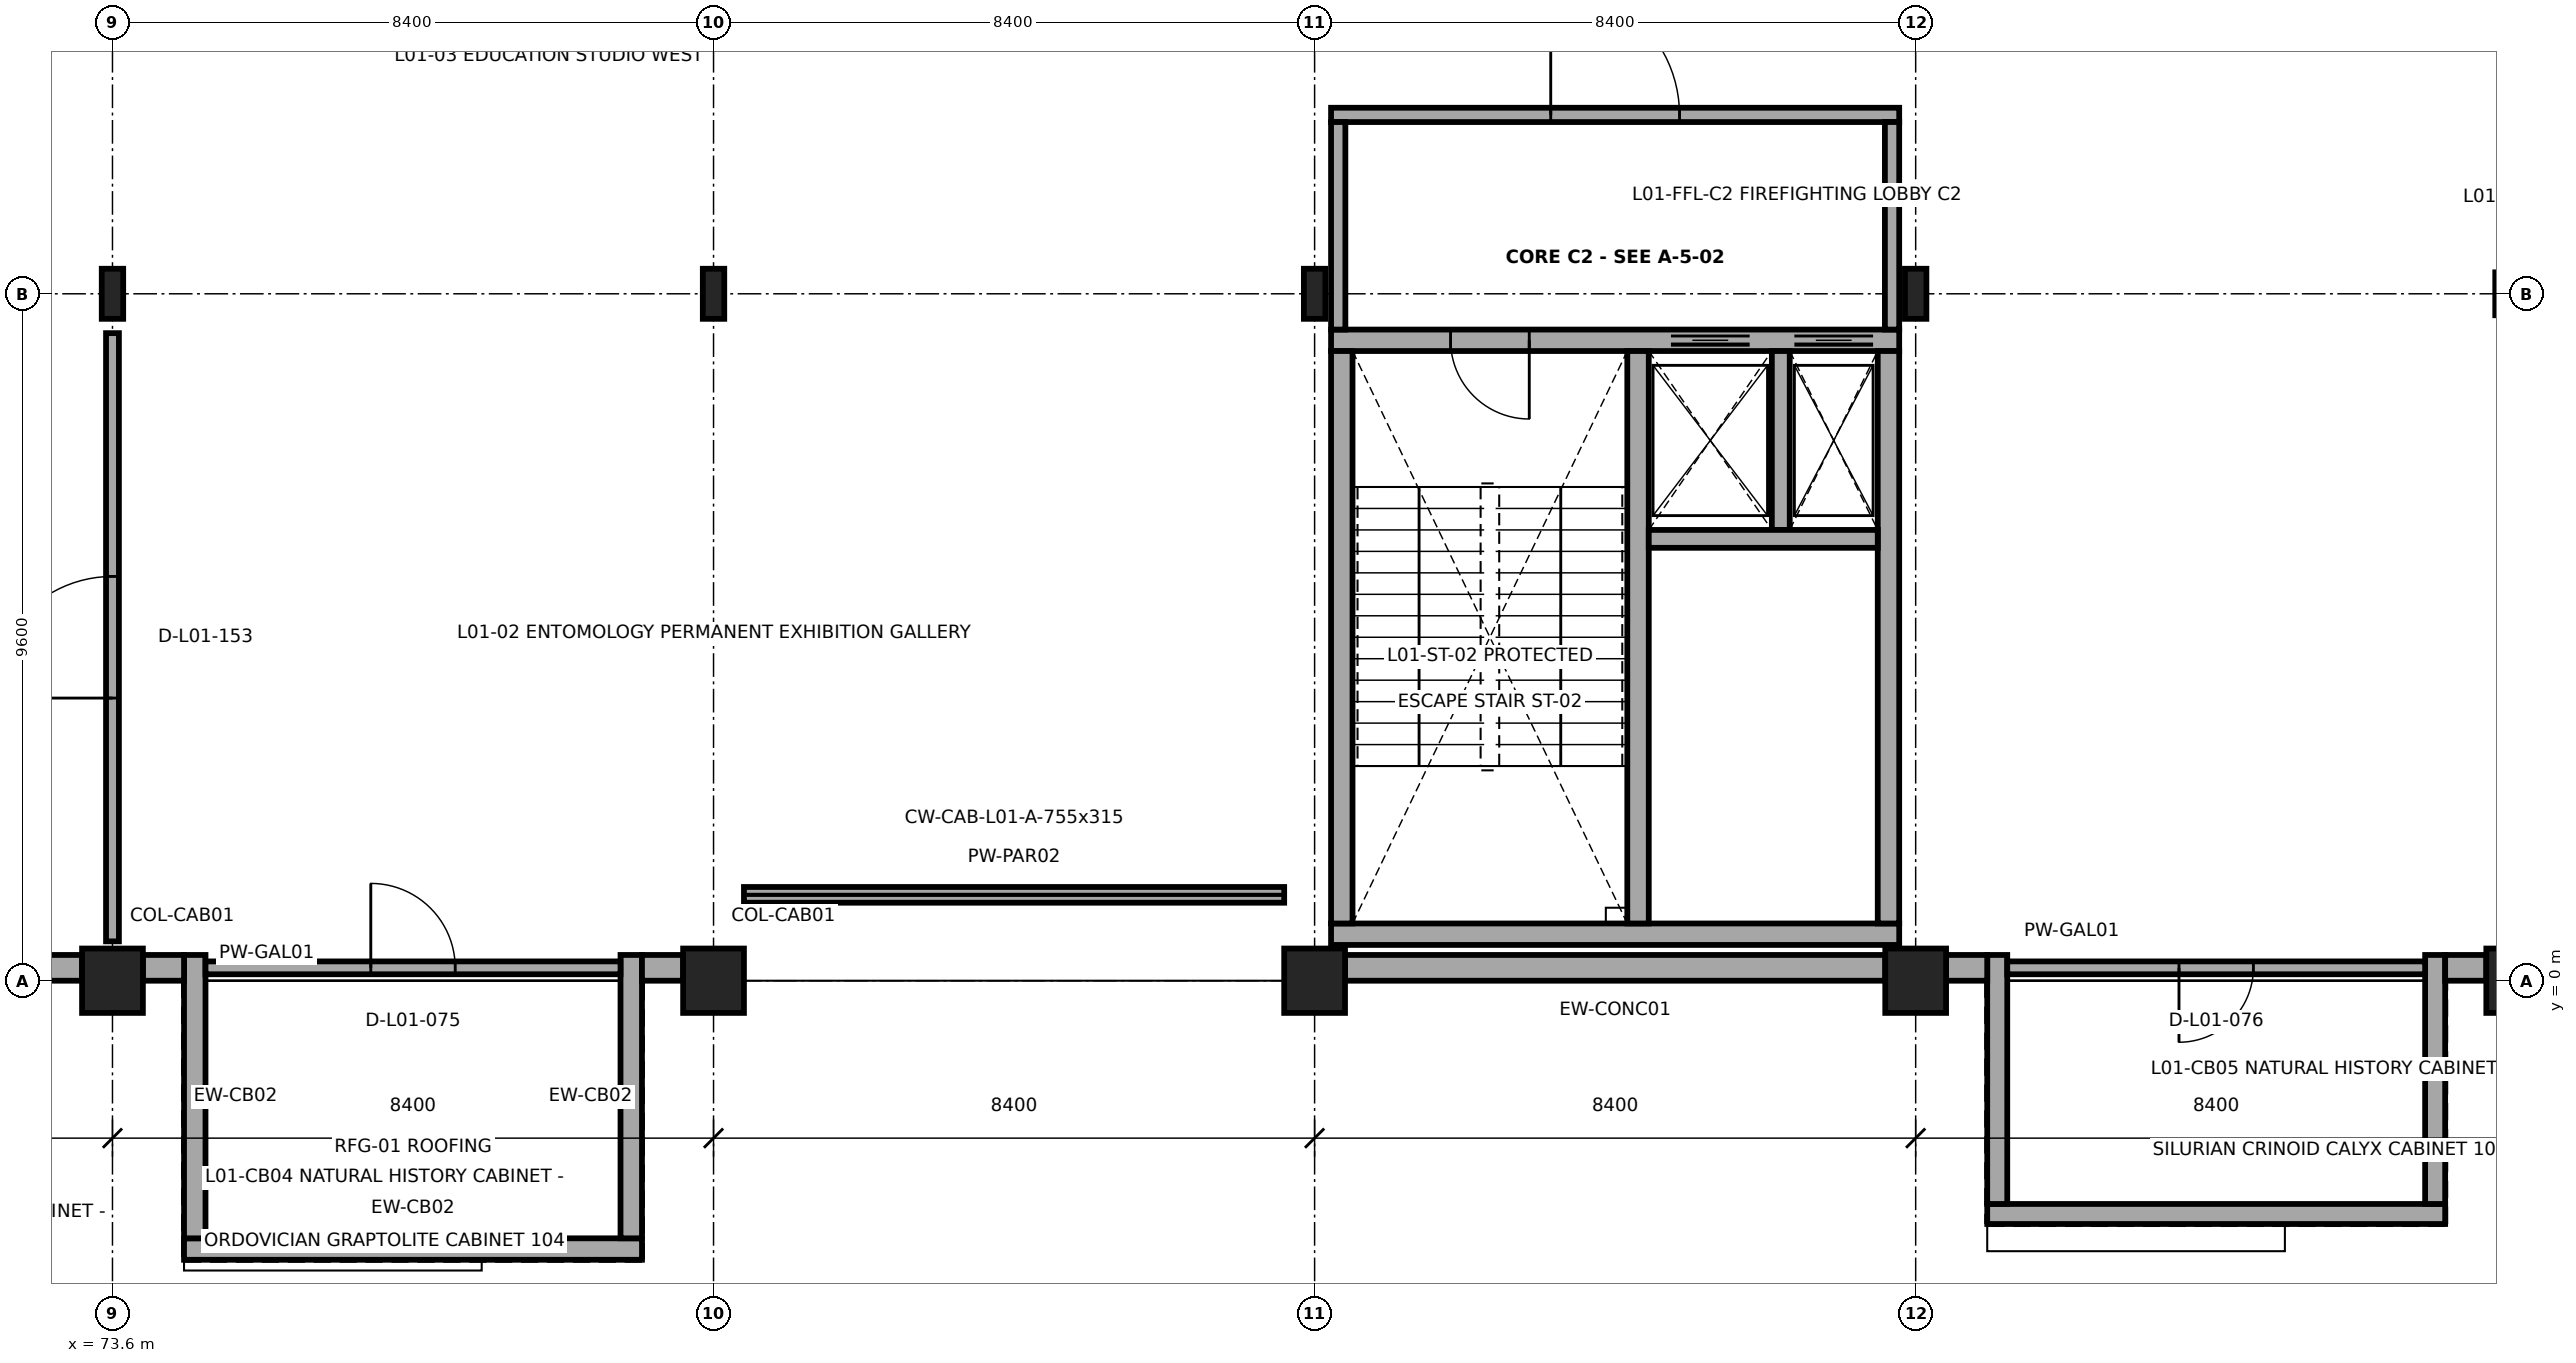
"""IFC4 building model, lengths in metres.
Left out: names, types, materials, properties, quantities, classifications, styles, units other than length and angle.
Written with IfcOpenShell. Run it as: python <this file> out.ifc"""

import sys

from ifc_helpers import new_model, si_unit, direction, frame, frame_2d, origin, origin_2d, place, context, subcontext, project, spatial, rectangle, i_section, extrude, element, fill, save


model = new_model("IFC4")
c1 = context("Model", 3, precision=1e-05, world=origin(), true_north=direction((0.0, 1.0)))
c2 = subcontext(c1, "Body", "Model", "MODEL_VIEW")
j1 = project(units=[si_unit("LENGTHUNIT", "METRE"), si_unit("PLANEANGLEUNIT", "RADIAN")], contexts=[c1])
p1 = place(None, origin())
s1 = spatial("IfcSite", under=j1, at=p1, CompositionType="ELEMENT")
p2 = place(p1, origin())
s2 = spatial("IfcBuilding", under=s1, at=p2, CompositionType="ELEMENT")
p3 = place(p2, frame((0.0, 0.0, 8.4)))
s3 = spatial("IfcBuildingStorey", under=s2, at=p3, CompositionType="ELEMENT", Elevation=8.4)
p4 = place(p3, frame((73.6, 0.0, 0.0), z_axis=(0.0, 0.0, 1.0), x_axis=(1.0, 0.0, 0.0)))
e1 = element("IfcColumn", 1, at=p4, inside=s3, PredefinedType="COLUMN", context=c2, shape_type="SweptSolid", body=[
    extrude(rectangle(XDim=0.85, YDim=0.9, at=origin_2d()), origin(), (0.0, 0.0, 1.0), 4.5),
])
p5 = place(p3, frame((73.6, 9.6, 0.0), z_axis=(0.0, 0.0, 1.0), x_axis=(1.0, 0.0, 0.0)))
e2 = element("IfcColumn", 2, at=p5, inside=s3, PredefinedType="COLUMN", context=c2, shape_type="SweptSolid", body=[
    extrude(i_section(OverallWidth=0.3, OverallDepth=0.7, WebThickness=0.017, FlangeThickness=0.032, FilletRadius=0.027, at=origin_2d()), origin(), (0.0, 0.0, 1.0), 4.5),
])
p6 = place(p3, frame((82.0, 0.0, 0.0), z_axis=(0.0, 0.0, 1.0), x_axis=(1.0, 0.0, 0.0)))
e3 = element("IfcColumn", 3, at=p6, inside=s3, PredefinedType="COLUMN", context=c2, shape_type="SweptSolid", body=[
    extrude(rectangle(XDim=0.85, YDim=0.9, at=origin_2d()), origin(), (0.0, 0.0, 1.0), 4.5),
])
p7 = place(p3, frame((82.0, 9.6, 0.0), z_axis=(0.0, 0.0, 1.0), x_axis=(1.0, 0.0, 0.0)))
e4 = element("IfcColumn", 4, at=p7, inside=s3, PredefinedType="COLUMN", context=c2, shape_type="SweptSolid", body=[
    extrude(i_section(OverallWidth=0.3, OverallDepth=0.7, WebThickness=0.017, FlangeThickness=0.032, FilletRadius=0.027, at=origin_2d()), origin(), (0.0, 0.0, 1.0), 4.5),
])
p8 = place(p3, frame((90.4, 0.0, 0.0), z_axis=(0.0, 0.0, 1.0), x_axis=(1.0, 0.0, 0.0)))
e5 = element("IfcColumn", 5, at=p8, inside=s3, PredefinedType="COLUMN", context=c2, shape_type="SweptSolid", body=[
    extrude(rectangle(XDim=0.85, YDim=0.9, at=origin_2d()), origin(), (0.0, 0.0, 1.0), 4.5),
])
p9 = place(p3, frame((90.4, 9.6, 0.0), z_axis=(0.0, 0.0, 1.0), x_axis=(1.0, 0.0, 0.0)))
e6 = element("IfcColumn", 6, at=p9, inside=s3, PredefinedType="COLUMN", context=c2, shape_type="SweptSolid", body=[
    extrude(i_section(OverallWidth=0.3, OverallDepth=0.7, WebThickness=0.017, FlangeThickness=0.032, FilletRadius=0.027, at=origin_2d()), origin(), (0.0, 0.0, 1.0), 4.5),
])
p10 = place(p3, frame((98.8, 0.0, 0.0), z_axis=(0.0, 0.0, 1.0), x_axis=(1.0, 0.0, 0.0)))
e7 = element("IfcColumn", 7, at=p10, inside=s3, PredefinedType="COLUMN", context=c2, shape_type="SweptSolid", body=[
    extrude(rectangle(XDim=0.85, YDim=0.9, at=origin_2d()), origin(), (0.0, 0.0, 1.0), 4.5),
])
p11 = place(p3, frame((98.8, 9.6, 0.0), z_axis=(0.0, 0.0, 1.0), x_axis=(1.0, 0.0, 0.0)))
e8 = element("IfcColumn", 8, at=p11, inside=s3, PredefinedType="COLUMN", context=c2, shape_type="SweptSolid", body=[
    extrude(i_section(OverallWidth=0.3, OverallDepth=0.7, WebThickness=0.017, FlangeThickness=0.032, FilletRadius=0.027, at=origin_2d()), origin(), (0.0, 0.0, 1.0), 4.5),
])
p12 = place(p3, frame((107.2, 0.0, 0.0), z_axis=(0.0, 0.0, 1.0), x_axis=(1.0, 0.0, 0.0)))
e9 = element("IfcColumn", 9, at=p12, inside=s3, PredefinedType="COLUMN", context=c2, shape_type="SweptSolid", body=[
    extrude(rectangle(XDim=0.85, YDim=0.9, at=origin_2d()), origin(), (0.0, 0.0, 1.0), 4.5),
])
p13 = place(p3, frame((74.6, -3.75, 0.0), z_axis=(0.0, 0.0, 1.0), x_axis=(1.0, 0.0, 0.0)))
e10 = element("IfcWall", 10, at=p13, inside=s3, PredefinedType="SOLIDWALL", context=c2, shape_type="SweptSolid", body=[
    extrude(rectangle(XDim=6.4, YDim=0.3, at=frame_2d((3.2, 0.0))), origin(), (0.0, 0.0, 1.0), 2.99),
])
for number, where, z_axis, x_axis in (
    (11, (74.75, 0.36, 0.0), (0.0, 0.0, 1.0), (0.0, -1.0, 0.0)),
    (12, (80.85, -3.6, 0.0), (0.0, 0.0, 1.0), (0.0, 1.0, 0.0)),
):
    element("IfcWall", number, at=place(p3, frame(where, z_axis=z_axis, x_axis=x_axis)), inside=s3, PredefinedType="SOLIDWALL", context=c2, shape_type="SweptSolid", body=[
        extrude(rectangle(XDim=3.96, YDim=0.3, at=frame_2d((1.98, 0.0))), origin(), (0.0, 0.0, 1.0), 2.99),
    ])
p14 = place(p3, frame((99.8, -3.26, 0.0), z_axis=(0.0, 0.0, 1.0), x_axis=(1.0, 0.0, 0.0)))
e13 = element("IfcWall", 13, at=p14, inside=s3, PredefinedType="SOLIDWALL", context=c2, shape_type="SweptSolid", body=[
    extrude(rectangle(XDim=6.4, YDim=0.28, at=frame_2d((3.2, 0.0))), origin(), (0.0, 0.0, 1.0), 2.99),
])
for number, where, z_axis, x_axis in (
    (14, (99.94, 0.36, 0.0), (0.0, 0.0, 1.0), (0.0, -1.0, 0.0)),
    (15, (106.06, -3.12, 0.0), (0.0, 0.0, 1.0), (0.0, 1.0, 0.0)),
):
    element("IfcWall", number, at=place(p3, frame(where, z_axis=z_axis, x_axis=x_axis)), inside=s3, PredefinedType="SOLIDWALL", context=c2, shape_type="SweptSolid", body=[
        extrude(rectangle(XDim=3.48, YDim=0.28, at=frame_2d((1.74, 0.0))), origin(), (0.0, 0.0, 1.0), 2.99),
    ])
p15 = place(p3, frame((72.6, 0.18, 0.0), z_axis=(0.0, 0.0, 1.0), x_axis=(1.0, 0.0, 0.0)))
e16 = element("IfcWall", 16, at=p15, inside=s3, PredefinedType="SOLIDWALL", context=c2, shape_type="SweptSolid", body=[
    extrude(rectangle(XDim=0.575, YDim=0.36, at=frame_2d((0.288, 0.0))), origin(), (0.0, 0.0, 1.0), 3.335),
])
p16 = place(p3, frame((74.025, 0.18, 0.0), z_axis=(0.0, 0.0, 1.0), x_axis=(1.0, 0.0, 0.0)))
e17 = element("IfcWall", 17, at=p16, inside=s3, PredefinedType="SOLIDWALL", context=c2, shape_type="SweptSolid", body=[
    extrude(rectangle(XDim=0.575, YDim=0.36, at=frame_2d((0.288, 0.0))), origin(), (0.0, 0.0, 1.0), 3.335),
])
p17 = place(p3, frame((81.0, 0.18, 0.0), z_axis=(0.0, 0.0, 1.0), x_axis=(1.0, 0.0, 0.0)))
e18 = element("IfcWall", 18, at=p17, inside=s3, PredefinedType="SOLIDWALL", context=c2, shape_type="SweptSolid", body=[
    extrude(rectangle(XDim=0.575, YDim=0.36, at=frame_2d((0.288, 0.0))), origin(), (0.0, 0.0, 1.0), 3.335),
])
p18 = place(p3, frame((82.425, 1.2, -0.002), z_axis=(0.0, 0.0, 1.0), x_axis=(1.0, 0.0, 0.0)))
e19 = element("IfcWall", 19, at=p18, inside=s3, PredefinedType="PARAPET", context=c2, shape_type="SweptSolid", body=[
    extrude(rectangle(XDim=7.55, YDim=0.22, at=frame_2d((3.775, 0.0))), origin(), (0.0, 0.0, 1.0), 0.186),
])
p19 = place(p3, frame((90.825, 0.18, 0.0), z_axis=(0.0, 0.0, 1.0), x_axis=(1.0, 0.0, 0.0)))
e20 = element("IfcWall", 20, at=p19, inside=s3, PredefinedType="SOLIDWALL", context=c2, shape_type="SweptSolid", body=[
    extrude(rectangle(XDim=7.55, YDim=0.36, at=frame_2d((3.775, 0.0))), origin(), (0.0, 0.0, 1.0), 3.335),
])
for number, where, z_axis, x_axis in (
    (21, (99.225, 0.18, 0.0), (0.0, 0.0, 1.0), (1.0, 0.0, 0.0)),
    (22, (106.2, 0.18, 0.0), (0.0, 0.0, 1.0), (1.0, 0.0, 0.0)),
):
    element("IfcWall", number, at=place(p3, frame(where, z_axis=z_axis, x_axis=x_axis)), inside=s3, PredefinedType="SOLIDWALL", context=c2, shape_type="SweptSolid", body=[
        extrude(rectangle(XDim=0.575, YDim=0.36, at=frame_2d((0.288, 0.0))), origin(), (0.0, 0.0, 1.0), 3.335),
    ])
p20 = place(p3, frame((90.63, 0.65, 0.0), z_axis=(0.0, 0.0, 1.0), x_axis=(1.0, 0.0, 0.0)))
e23 = element("IfcWall", 23, at=p20, inside=s3, PredefinedType="SHEAR", context=c2, shape_type="SweptSolid", body=[
    extrude(rectangle(XDim=7.94, YDim=0.3, at=frame_2d((3.97, 0.0))), origin(), (0.0, 0.0, 1.0), 4.25),
])
p21 = place(p3, frame((98.57, 8.95, 0.0), z_axis=(0.0, 0.0, 1.0), x_axis=(-1.0, 0.0, 0.0)))
e24 = element("IfcWall", 24, at=p21, inside=s3, PredefinedType="SHEAR", context=c2, shape_type="SweptSolid", body=[
    extrude(rectangle(XDim=7.94, YDim=0.3, at=frame_2d((3.97, 0.0))), origin(), (0.0, 0.0, 1.0), 4.25),
])
p22 = place(p21, frame((5.17, 0.0, 0.0)))
e25 = element("IfcOpeningElement", 25, at=p22, cuts=e24, PredefinedType="OPENING", context=c2, shape_type="SweptSolid", body=[
    extrude(rectangle(XDim=1.1, YDim=2.2, at=frame_2d((0.55, 1.1))), frame((0.0, 0.16, 0.0), z_axis=(0.0, -1.0, 0.0), x_axis=(1.0, 0.0, 0.0)), (0.0, 0.0, 1.0), 0.32),
])
p23 = place(p21, frame((2.09, 0.0, 0.0)))
e26 = element("IfcOpeningElement", 26, at=p23, cuts=e24, PredefinedType="OPENING", context=c2, shape_type="SweptSolid", body=[
    extrude(rectangle(XDim=1.1, YDim=2.1, at=frame_2d((0.55, 1.05))), frame((0.0, 0.16, 0.0), z_axis=(0.0, -1.0, 0.0), x_axis=(1.0, 0.0, 0.0)), (0.0, 0.0, 1.0), 0.32),
])
p24 = place(p21, frame((0.365, 0.0, 0.0)))
e27 = element("IfcOpeningElement", 27, at=p24, cuts=e24, PredefinedType="OPENING", context=c2, shape_type="SweptSolid", body=[
    extrude(rectangle(XDim=1.1, YDim=2.1, at=frame_2d((0.55, 1.05))), frame((0.0, 0.16, 0.0), z_axis=(0.0, -1.0, 0.0), x_axis=(1.0, 0.0, 0.0)), (0.0, 0.0, 1.0), 0.32),
])
for number, where, z_axis, x_axis in (
    (28, (90.78, 8.8, 0.0), (0.0, 0.0, 1.0), (0.0, -1.0, 0.0)),
    (29, (98.42, 0.8, 0.0), (0.0, 0.0, 1.0), (0.0, 1.0, 0.0)),
    (30, (94.92, 0.8, 0.0), (0.0, 0.0, 1.0), (0.0, 1.0, 0.0)),
):
    element("IfcWall", number, at=place(p3, frame(where, z_axis=z_axis, x_axis=x_axis)), inside=s3, PredefinedType="SHEAR", context=c2, shape_type="SweptSolid", body=[
        extrude(rectangle(XDim=8.0, YDim=0.3, at=frame_2d((4.0, 0.0))), origin(), (0.0, 0.0, 1.0), 4.25),
    ])
p25 = place(p3, frame((96.915, 6.3, 0.0), z_axis=(0.0, 0.0, 1.0), x_axis=(0.0, 1.0, 0.0)))
e31 = element("IfcWall", 31, at=p25, inside=s3, PredefinedType="SHEAR", context=c2, shape_type="SweptSolid", body=[
    extrude(rectangle(XDim=2.5, YDim=0.25, at=frame_2d((1.25, 0.0))), origin(), (0.0, 0.0, 1.0), 4.25),
])
p26 = place(p3, frame((95.07, 6.175, 0.0), z_axis=(0.0, 0.0, 1.0), x_axis=(1.0, 0.0, 0.0)))
e32 = element("IfcWall", 32, at=p26, inside=s3, PredefinedType="SHEAR", context=c2, shape_type="SweptSolid", body=[
    extrude(rectangle(XDim=3.2, YDim=0.25, at=frame_2d((1.6, 0.0))), origin(), (0.0, 0.0, 1.0), 4.25),
])
p27 = place(p3, frame((90.63, 12.1, 0.0), z_axis=(0.0, 0.0, 1.0), x_axis=(1.0, 0.0, 0.0)))
e33 = element("IfcWall", 33, at=p27, inside=s3, PredefinedType="SOLIDWALL", context=c2, shape_type="SweptSolid", body=[
    extrude(rectangle(XDim=7.94, YDim=0.2, at=frame_2d((3.97, 0.0))), origin(), (0.0, 0.0, 1.0), 3.902),
])
p28 = place(p27, frame((3.07, 0.0, 0.0)))
e34 = element("IfcOpeningElement", 34, at=p28, cuts=e33, PredefinedType="OPENING", context=c2, shape_type="SweptSolid", body=[
    extrude(rectangle(XDim=1.8, YDim=2.2, at=frame_2d((0.9, 1.1))), frame((0.0, 0.11, 0.0), z_axis=(0.0, -1.0, 0.0), x_axis=(1.0, 0.0, 0.0)), (0.0, 0.0, 1.0), 0.22),
])
for number, where, z_axis, x_axis in (
    (35, (90.73, 9.1, 0.0), (0.0, 0.0, 1.0), (0.0, 1.0, 0.0)),
    (36, (98.47, 12.0, 0.0), (0.0, 0.0, 1.0), (0.0, -1.0, 0.0)),
):
    element("IfcWall", number, at=place(p3, frame(where, z_axis=z_axis, x_axis=x_axis)), inside=s3, PredefinedType="SOLIDWALL", context=c2, shape_type="SweptSolid", body=[
        extrude(rectangle(XDim=2.9, YDim=0.2, at=frame_2d((1.45, 0.0))), origin(), (0.0, 0.0, 1.0), 3.592),
    ])
p29 = place(p3, frame((74.9, 0.18, 0.0), z_axis=(0.0, 0.0, 1.0), x_axis=(1.0, 0.0, 0.0)))
e37 = element("IfcWall", 37, at=p29, inside=s3, PredefinedType="PARTITIONING", context=c2, shape_type="SweptSolid", body=[
    extrude(rectangle(XDim=5.8, YDim=0.18, at=frame_2d((2.9, 0.0))), origin(), (0.0, 0.0, 1.0), 2.99),
])
p30 = place(p29, frame((2.31, 0.0, 0.0)))
e38 = element("IfcOpeningElement", 38, at=p30, cuts=e37, PredefinedType="OPENING", context=c2, shape_type="SweptSolid", body=[
    extrude(rectangle(XDim=1.18, YDim=2.25, at=frame_2d((0.59, 1.125))), frame((0.0, 0.1, 0.0), z_axis=(0.0, -1.0, 0.0), x_axis=(1.0, 0.0, 0.0)), (0.0, 0.0, 1.0), 0.2),
])
p31 = place(p3, frame((100.08, 0.18, 0.0), z_axis=(0.0, 0.0, 1.0), x_axis=(1.0, 0.0, 0.0)))
e39 = element("IfcWall", 39, at=p31, inside=s3, PredefinedType="PARTITIONING", context=c2, shape_type="SweptSolid", body=[
    extrude(rectangle(XDim=5.84, YDim=0.18, at=frame_2d((2.92, 0.0))), origin(), (0.0, 0.0, 1.0), 2.99),
])
p32 = place(p31, frame((2.4, 0.0, 0.0)))
e40 = element("IfcOpeningElement", 40, at=p32, cuts=e39, PredefinedType="OPENING", context=c2, shape_type="SweptSolid", body=[
    extrude(rectangle(XDim=1.04, YDim=2.18, at=frame_2d((0.52, 1.09))), frame((0.0, 0.1, 0.0), z_axis=(0.0, -1.0, 0.0), x_axis=(1.0, 0.0, 0.0)), (0.0, 0.0, 1.0), 0.2),
])
p33 = place(p3, frame((73.6, 0.55, 0.0), z_axis=(0.0, 0.0, 1.0), x_axis=(0.0, 1.0, 0.0)))
e41 = element("IfcWall", 41, at=p33, inside=s3, PredefinedType="PARTITIONING", context=c2, shape_type="SweptSolid", body=[
    extrude(rectangle(XDim=8.5, YDim=0.18, at=frame_2d((4.25, 0.0))), origin(), (0.0, 0.0, 1.0), 3.902),
])
p34 = place(p33, frame((3.4, 0.0, 0.0)))
e42 = element("IfcOpeningElement", 42, at=p34, cuts=e41, PredefinedType="OPENING", context=c2, shape_type="SweptSolid", body=[
    extrude(rectangle(XDim=1.7, YDim=2.35, at=frame_2d((0.85, 1.175))), frame((0.0, 0.1, 0.0), z_axis=(0.0, -1.0, 0.0), x_axis=(1.0, 0.0, 0.0)), (0.0, 0.0, 1.0), 0.2),
])
p35 = place(p22, origin())
e43 = element("IfcDoor", 43, at=p35, inside=s3, OperationType="SINGLE_SWING_LEFT", PredefinedType="DOOR", context=c2, shape_type="SweptSolid", body=[
    extrude(rectangle(XDim=1.1, YDim=2.2, at=frame_2d((0.55, 1.1))), frame((0.0, 0.025, 0.0), z_axis=(0.0, -1.0, 0.0), x_axis=(1.0, 0.0, 0.0)), (0.0, 0.0, 1.0), 0.05),
])
fill(e25, e43)
p36 = place(p23, origin())
e44 = element("IfcDoor", 44, at=p36, inside=s3, OperationType="SLIDING_TO_LEFT", PredefinedType="DOOR", context=c2, shape_type="SweptSolid", body=[
    extrude(rectangle(XDim=1.1, YDim=2.1, at=frame_2d((0.55, 1.05))), frame((0.0, 0.025, 0.0), z_axis=(0.0, -1.0, 0.0), x_axis=(1.0, 0.0, 0.0)), (0.0, 0.0, 1.0), 0.05),
])
fill(e26, e44)
p37 = place(p24, origin())
e45 = element("IfcDoor", 45, at=p37, inside=s3, OperationType="SLIDING_TO_LEFT", PredefinedType="DOOR", context=c2, shape_type="SweptSolid", body=[
    extrude(rectangle(XDim=1.1, YDim=2.1, at=frame_2d((0.55, 1.05))), frame((0.0, 0.025, 0.0), z_axis=(0.0, -1.0, 0.0), x_axis=(1.0, 0.0, 0.0)), (0.0, 0.0, 1.0), 0.05),
])
fill(e27, e45)
p38 = place(p28, origin())
e46 = element("IfcDoor", 46, at=p38, inside=s3, OperationType="DOUBLE_DOOR_SINGLE_SWING", PredefinedType="DOOR", context=c2, shape_type="SweptSolid", body=[
    extrude(rectangle(XDim=1.8, YDim=2.2, at=frame_2d((0.9, 1.1))), frame((0.0, 0.025, 0.0), z_axis=(0.0, -1.0, 0.0), x_axis=(1.0, 0.0, 0.0)), (0.0, 0.0, 1.0), 0.05),
])
fill(e34, e46)
p39 = place(p30, origin())
e47 = element("IfcDoor", 47, at=p39, inside=s3, OperationType="SINGLE_SWING_LEFT", PredefinedType="DOOR", context=c2, shape_type="SweptSolid", body=[
    extrude(rectangle(XDim=1.18, YDim=2.25, at=frame_2d((0.59, 1.125))), frame((0.0, 0.025, 0.0), z_axis=(0.0, -1.0, 0.0), x_axis=(1.0, 0.0, 0.0)), (0.0, 0.0, 1.0), 0.05),
])
fill(e38, e47)
p40 = place(p32, origin())
e48 = element("IfcDoor", 48, at=p40, inside=s3, OperationType="SINGLE_SWING_RIGHT", PredefinedType="DOOR", context=c2, shape_type="SweptSolid", body=[
    extrude(rectangle(XDim=1.04, YDim=2.18, at=frame_2d((0.52, 1.09))), frame((0.0, 0.025, 0.0), z_axis=(0.0, -1.0, 0.0), x_axis=(1.0, 0.0, 0.0)), (0.0, 0.0, 1.0), 0.05),
])
fill(e40, e48)
p41 = place(p34, origin())
e49 = element("IfcDoor", 49, at=p41, inside=s3, OperationType="DOUBLE_DOOR_SINGLE_SWING", PredefinedType="DOOR", context=c2, shape_type="SweptSolid", body=[
    extrude(rectangle(XDim=1.7, YDim=2.35, at=frame_2d((0.85, 1.175))), frame((0.0, 0.025, 0.0), z_axis=(0.0, -1.0, 0.0), x_axis=(1.0, 0.0, 0.0)), (0.0, 0.0, 1.0), 0.05),
])
fill(e42, e49)
save(model, sys.argv[1])
